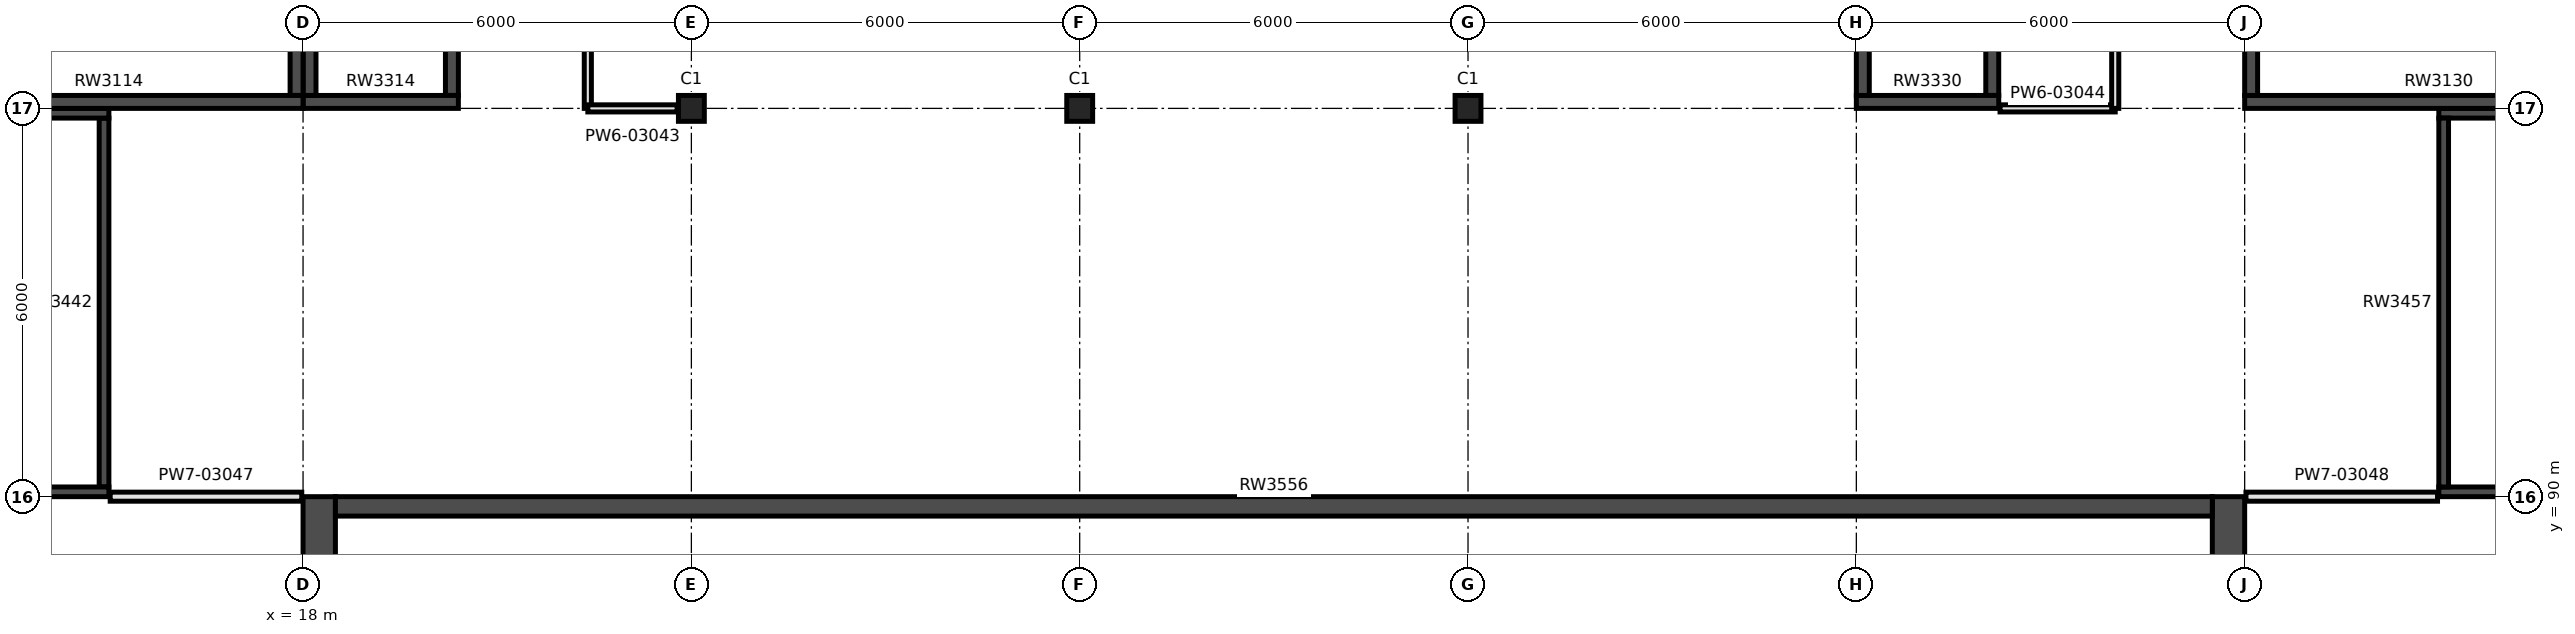
"""IFC4 building model, lengths in metres.
Left out: names, types, materials, properties, quantities, classifications, styles, units other than length and angle.
Written with IfcOpenShell. Run it as: python <this file> out.ifc"""

import sys

from ifc_helpers import new_model, si_unit, direction, frame, frame_2d, origin, origin_2d, place, context, subcontext, project, spatial, rectangle, extrude, element, fill, save


model = new_model("IFC4")
c1 = context("Model", 3, precision=1e-05, world=origin(), true_north=direction((0.0, 1.0)))
c2 = subcontext(c1, "Body", "Model", "MODEL_VIEW")
j1 = project(units=[si_unit("LENGTHUNIT", "METRE"), si_unit("PLANEANGLEUNIT", "RADIAN")], contexts=[c1])
p1 = place(None, origin())
s1 = spatial("IfcSite", under=j1, at=p1, CompositionType="ELEMENT")
p2 = place(p1, origin())
s2 = spatial("IfcBuilding", under=s1, at=p2, CompositionType="ELEMENT")
p3 = place(p2, frame((0.0, 0.0, 16.5)))
s3 = spatial("IfcBuildingStorey", under=s2, at=p3, CompositionType="ELEMENT", Elevation=16.5)
for number, where, z_axis, x_axis in (
    (1, (24.0, 96.0, 0.0), (0.0, 0.0, 1.0), (1.0, 0.0, 0.0)),
    (2, (30.0, 96.0, 0.0), (0.0, 0.0, 1.0), (1.0, 0.0, 0.0)),
    (3, (36.0, 96.0, 0.0), (0.0, 0.0, 1.0), (1.0, 0.0, 0.0)),
):
    element("IfcColumn", number, at=place(p3, frame(where, z_axis=z_axis, x_axis=x_axis)), inside=s3, PredefinedType="COLUMN", context=c2, shape_type="SweptSolid", body=[
        extrude(rectangle(XDim=0.4, YDim=0.4, at=origin_2d()), origin(), (0.0, 0.0, 1.0), 11.5),
    ])
p4 = place(p3, frame((12.0, 96.1, 0.0), z_axis=(0.0, 0.0, 1.0), x_axis=(1.0, 0.0, 0.0)))
e4 = element("IfcWall", 4, at=p4, inside=s3, PredefinedType="SHEAR", context=c2, shape_type="SweptSolid", body=[
    extrude(rectangle(XDim=6.0, YDim=0.2, at=frame_2d((3.0, 0.0))), origin(), (0.0, 0.0, 1.0), 11.5),
])
p5 = place(p3, frame((17.9, 96.2, 0.0), z_axis=(0.0, 0.0, 1.0), x_axis=(0.0, 1.0, 0.0)))
e5 = element("IfcWall", 5, at=p5, inside=s3, PredefinedType="SHEAR", context=c2, shape_type="SweptSolid", body=[
    extrude(rectangle(XDim=5.6, YDim=0.2, at=frame_2d((2.8, 0.0))), origin(), (0.0, 0.0, 1.0), 11.5),
])
p6 = place(p3, frame((48.0, 96.1, 0.0), z_axis=(0.0, 0.0, 1.0), x_axis=(1.0, 0.0, 0.0)))
e6 = element("IfcWall", 6, at=p6, inside=s3, PredefinedType="SHEAR", context=c2, shape_type="SweptSolid", body=[
    extrude(rectangle(XDim=6.0, YDim=0.2, at=frame_2d((3.0, 0.0))), origin(), (0.0, 0.0, 1.0), 11.5),
])
p7 = place(p3, frame((48.1, 96.2, 0.0), z_axis=(0.0, 0.0, 1.0), x_axis=(0.0, 1.0, 0.0)))
e7 = element("IfcWall", 7, at=p7, inside=s3, PredefinedType="SHEAR", context=c2, shape_type="SweptSolid", body=[
    extrude(rectangle(XDim=5.6, YDim=0.2, at=frame_2d((2.8, 0.0))), origin(), (0.0, 0.0, 1.0), 11.5),
])
p8 = place(p7, frame((4.4, 0.0, 0.0)))
e8 = element("IfcOpeningElement", 8, at=p8, cuts=e7, PredefinedType="OPENING", context=c2, shape_type="SweptSolid", body=[
    extrude(rectangle(XDim=1.1, YDim=2.2, at=frame_2d((0.55, 1.1))), frame((0.0, 0.11, 0.0), z_axis=(0.0, -1.0, 0.0), x_axis=(1.0, 0.0, 0.0)), (0.0, 0.0, 1.0), 0.22),
])
p9 = place(p3, frame((18.0, 96.1, 0.0), z_axis=(0.0, 0.0, 1.0), x_axis=(1.0, 0.0, 0.0)))
e9 = element("IfcWall", 9, at=p9, inside=s3, PredefinedType="SHEAR", context=c2, shape_type="SweptSolid", body=[
    extrude(rectangle(XDim=2.4, YDim=0.2, at=frame_2d((1.2, 0.0))), origin(), (0.0, 0.0, 1.0), 11.5),
])
for number, where, z_axis, x_axis in (
    (10, (18.1, 96.2, 0.0), (0.0, 0.0, 1.0), (0.0, 1.0, 0.0)),
    (11, (20.3, 96.2, 0.0), (0.0, 0.0, 1.0), (0.0, 1.0, 0.0)),
):
    element("IfcWall", number, at=place(p3, frame(where, z_axis=z_axis, x_axis=x_axis)), inside=s3, PredefinedType="SHEAR", context=c2, shape_type="SweptSolid", body=[
        extrude(rectangle(XDim=2.8, YDim=0.2, at=frame_2d((1.4, 0.0))), origin(), (0.0, 0.0, 1.0), 11.5),
    ])
p10 = place(p3, frame((42.0, 96.1, 0.0), z_axis=(0.0, 0.0, 1.0), x_axis=(1.0, 0.0, 0.0)))
e12 = element("IfcWall", 12, at=p10, inside=s3, PredefinedType="SHEAR", context=c2, shape_type="SweptSolid", body=[
    extrude(rectangle(XDim=2.2, YDim=0.2, at=frame_2d((1.1, 0.0))), origin(), (0.0, 0.0, 1.0), 11.5),
])
for number, where, z_axis, x_axis in (
    (13, (42.1, 96.2, 0.0), (0.0, 0.0, 1.0), (0.0, 1.0, 0.0)),
    (14, (44.1, 96.2, 0.0), (0.0, 0.0, 1.0), (0.0, 1.0, 0.0)),
):
    element("IfcWall", number, at=place(p3, frame(where, z_axis=z_axis, x_axis=x_axis)), inside=s3, PredefinedType="SHEAR", context=c2, shape_type="SweptSolid", body=[
        extrude(rectangle(XDim=2.0, YDim=0.2, at=frame_2d((1.0, 0.0))), origin(), (0.0, 0.0, 1.0), 11.5),
    ])
for number, where, z_axis, x_axis in (
    (15, (12.0, 95.925, 0.0), (0.0, 0.0, 1.0), (1.0, 0.0, 0.0)),
    (16, (12.0, 90.075, 0.0), (0.0, 0.0, 1.0), (1.0, 0.0, 0.0)),
):
    element("IfcWall", number, at=place(p3, frame(where, z_axis=z_axis, x_axis=x_axis)), inside=s3, PredefinedType="SHEAR", context=c2, shape_type="SweptSolid", body=[
        extrude(rectangle(XDim=3.0, YDim=0.15, at=frame_2d((1.5, 0.0))), origin(), (0.0, 0.0, 1.0), 11.5),
    ])
p11 = place(p3, frame((14.925, 90.15, 0.0), z_axis=(0.0, 0.0, 1.0), x_axis=(0.0, 1.0, 0.0)))
e17 = element("IfcWall", 17, at=p11, inside=s3, PredefinedType="SHEAR", context=c2, shape_type="SweptSolid", body=[
    extrude(rectangle(XDim=5.7, YDim=0.15, at=frame_2d((2.85, 0.0))), origin(), (0.0, 0.0, 1.0), 11.5),
])
for number, where, z_axis, x_axis in (
    (18, (51.0, 95.925, 0.0), (0.0, 0.0, 1.0), (1.0, 0.0, 0.0)),
    (19, (51.0, 90.075, 0.0), (0.0, 0.0, 1.0), (1.0, 0.0, 0.0)),
):
    element("IfcWall", number, at=place(p3, frame(where, z_axis=z_axis, x_axis=x_axis)), inside=s3, PredefinedType="SHEAR", context=c2, shape_type="SweptSolid", body=[
        extrude(rectangle(XDim=3.0, YDim=0.15, at=frame_2d((1.5, 0.0))), origin(), (0.0, 0.0, 1.0), 11.5),
    ])
p12 = place(p3, frame((51.075, 90.15, 0.0), z_axis=(0.0, 0.0, 1.0), x_axis=(0.0, 1.0, 0.0)))
e20 = element("IfcWall", 20, at=p12, inside=s3, PredefinedType="SHEAR", context=c2, shape_type="SweptSolid", body=[
    extrude(rectangle(XDim=5.7, YDim=0.15, at=frame_2d((2.85, 0.0))), origin(), (0.0, 0.0, 1.0), 11.5),
])
p13 = place(p3, frame((18.25, 54.5, 0.0), z_axis=(0.0, 0.0, 1.0), x_axis=(0.0, 1.0, 0.0)))
e21 = element("IfcWall", 21, at=p13, inside=s3, PredefinedType="SHEAR", context=c2, shape_type="SweptSolid", body=[
    extrude(rectangle(XDim=35.5, YDim=0.5, at=frame_2d((17.75, 0.0))), origin(), (0.0, 0.0, 1.0), 3.9),
])
p14 = place(p13, frame((29.35, 0.0, 0.0)))
e22 = element("IfcOpeningElement", 22, at=p14, cuts=e21, PredefinedType="OPENING", context=c2, shape_type="SweptSolid", body=[
    extrude(rectangle(XDim=1.3, YDim=2.1, at=frame_2d((0.65, 1.05))), frame((0.0, 0.26, 0.0), z_axis=(0.0, -1.0, 0.0), x_axis=(1.0, 0.0, 0.0)), (0.0, 0.0, 1.0), 0.52),
])
p15 = place(p13, frame((2.6, 0.0, 0.0)))
e23 = element("IfcOpeningElement", 23, at=p15, cuts=e21, PredefinedType="OPENING", context=c2, shape_type="SweptSolid", body=[
    extrude(rectangle(XDim=1.0, YDim=2.1, at=frame_2d((0.5, 1.05))), frame((0.0, 0.26, 0.0), z_axis=(0.0, -1.0, 0.0), x_axis=(1.0, 0.0, 0.0)), (0.0, 0.0, 1.0), 0.52),
])
p16 = place(p3, frame((47.75, 54.5, 0.0), z_axis=(0.0, 0.0, 1.0), x_axis=(0.0, 1.0, 0.0)))
e24 = element("IfcWall", 24, at=p16, inside=s3, PredefinedType="SHEAR", context=c2, shape_type="SweptSolid", body=[
    extrude(rectangle(XDim=35.5, YDim=0.5, at=frame_2d((17.75, 0.0))), origin(), (0.0, 0.0, 1.0), 3.9),
])
p17 = place(p16, frame((29.35, 0.0, 0.0)))
e25 = element("IfcOpeningElement", 25, at=p17, cuts=e24, PredefinedType="OPENING", context=c2, shape_type="SweptSolid", body=[
    extrude(rectangle(XDim=1.3, YDim=2.1, at=frame_2d((0.65, 1.05))), frame((0.0, 0.26, 0.0), z_axis=(0.0, -1.0, 0.0), x_axis=(1.0, 0.0, 0.0)), (0.0, 0.0, 1.0), 0.52),
])
p18 = place(p16, frame((2.6, 0.0, 0.0)))
e26 = element("IfcOpeningElement", 26, at=p18, cuts=e24, PredefinedType="OPENING", context=c2, shape_type="SweptSolid", body=[
    extrude(rectangle(XDim=1.0, YDim=2.1, at=frame_2d((0.5, 1.05))), frame((0.0, 0.26, 0.0), z_axis=(0.0, -1.0, 0.0), x_axis=(1.0, 0.0, 0.0)), (0.0, 0.0, 1.0), 0.52),
])
p19 = place(p3, frame((18.5, 89.85, 0.0), z_axis=(0.0, 0.0, 1.0), x_axis=(1.0, 0.0, 0.0)))
e27 = element("IfcWall", 27, at=p19, inside=s3, PredefinedType="SHEAR", context=c2, shape_type="SweptSolid", body=[
    extrude(rectangle(XDim=29.0, YDim=0.3, at=frame_2d((14.5, 0.0))), origin(), (0.0, 0.0, 1.0), 11.5),
])
p20 = place(p3, frame((22.4, 96.0, 0.0), z_axis=(0.0, 0.0, 1.0), x_axis=(0.0, 1.0, 0.0)))
e28 = element("IfcWall", 28, at=p20, inside=s3, PredefinedType="PARTITIONING", context=c2, shape_type="SweptSolid", body=[
    extrude(rectangle(XDim=3.2, YDim=0.11, at=frame_2d((1.6, 0.0))), origin(), (0.0, 0.0, 1.0), 6.28),
])
p21 = place(p20, frame((1.25, 0.0, 0.0)))
e29 = element("IfcOpeningElement", 29, at=p21, cuts=e28, PredefinedType="OPENING", context=c2, shape_type="SweptSolid", body=[
    extrude(rectangle(XDim=0.75, YDim=2.04, at=frame_2d((0.375, 1.02))), frame((0.0, 0.065, 0.0), z_axis=(0.0, -1.0, 0.0), x_axis=(1.0, 0.0, 0.0)), (0.0, 0.0, 1.0), 0.13),
])
p22 = place(p3, frame((22.4, 96.0, 0.0), z_axis=(0.0, 0.0, 1.0), x_axis=(1.0, 0.0, 0.0)))
e30 = element("IfcWall", 30, at=p22, inside=s3, PredefinedType="PARTITIONING", context=c2, shape_type="SweptSolid", body=[
    extrude(rectangle(XDim=1.38, YDim=0.11, at=frame_2d((0.69, 0.0))), origin(), (0.0, 0.0, 1.0), 6.28),
])
p23 = place(p3, frame((44.22, 96.0, 0.0), z_axis=(0.0, 0.0, 1.0), x_axis=(1.0, 0.0, 0.0)))
e31 = element("IfcWall", 31, at=p23, inside=s3, PredefinedType="PARTITIONING", context=c2, shape_type="SweptSolid", body=[
    extrude(rectangle(XDim=1.78, YDim=0.11, at=frame_2d((0.89, 0.0))), origin(), (0.0, 0.0, 1.0), 6.28),
])
p24 = place(p3, frame((46.0, 96.0, 0.0), z_axis=(0.0, 0.0, 1.0), x_axis=(0.0, 1.0, 0.0)))
e32 = element("IfcWall", 32, at=p24, inside=s3, PredefinedType="PARTITIONING", context=c2, shape_type="SweptSolid", body=[
    extrude(rectangle(XDim=2.4, YDim=0.11, at=frame_2d((1.2, 0.0))), origin(), (0.0, 0.0, 1.0), 6.28),
])
p25 = place(p24, frame((0.85, 0.0, 0.0)))
e33 = element("IfcOpeningElement", 33, at=p25, cuts=e32, PredefinedType="OPENING", context=c2, shape_type="SweptSolid", body=[
    extrude(rectangle(XDim=0.75, YDim=2.04, at=frame_2d((0.375, 1.02))), frame((0.0, 0.065, 0.0), z_axis=(0.0, -1.0, 0.0), x_axis=(1.0, 0.0, 0.0)), (0.0, 0.0, 1.0), 0.13),
])
p26 = place(p3, frame((15.02, 90.0, 0.0), z_axis=(0.0, 0.0, 1.0), x_axis=(1.0, 0.0, 0.0)))
e34 = element("IfcWall", 34, at=p26, inside=s3, PredefinedType="PARTITIONING", context=c2, shape_type="SweptSolid", body=[
    extrude(rectangle(XDim=2.96, YDim=0.14, at=frame_2d((1.48, 0.0))), origin(), (0.0, 0.0, 1.0), 3.9),
])
p27 = place(p26, frame((0.53, 0.0, 0.0)))
e35 = element("IfcOpeningElement", 35, at=p27, cuts=e34, PredefinedType="OPENING", context=c2, shape_type="SweptSolid", body=[
    extrude(rectangle(XDim=1.8, YDim=2.1, at=frame_2d((0.9, 1.05))), frame((0.0, 0.08, 0.0), z_axis=(0.0, -1.0, 0.0), x_axis=(1.0, 0.0, 0.0)), (0.0, 0.0, 1.0), 0.16),
])
p28 = place(p3, frame((48.02, 90.0, 0.0), z_axis=(0.0, 0.0, 1.0), x_axis=(1.0, 0.0, 0.0)))
e36 = element("IfcWall", 36, at=p28, inside=s3, PredefinedType="PARTITIONING", context=c2, shape_type="SweptSolid", body=[
    extrude(rectangle(XDim=2.96, YDim=0.14, at=frame_2d((1.48, 0.0))), origin(), (0.0, 0.0, 1.0), 3.9),
])
p29 = place(p28, frame((0.53, 0.0, 0.0)))
e37 = element("IfcOpeningElement", 37, at=p29, cuts=e36, PredefinedType="OPENING", context=c2, shape_type="SweptSolid", body=[
    extrude(rectangle(XDim=1.8, YDim=2.1, at=frame_2d((0.9, 1.05))), frame((0.0, 0.08, 0.0), z_axis=(0.0, -1.0, 0.0), x_axis=(1.0, 0.0, 0.0)), (0.0, 0.0, 1.0), 0.16),
])
p30 = place(p25, origin())
e38 = element("IfcDoor", 38, at=p30, inside=s3, OperationType="SINGLE_SWING_LEFT", PredefinedType="DOOR", context=c2, shape_type="SweptSolid", body=[
    extrude(rectangle(XDim=0.75, YDim=2.04, at=frame_2d((0.375, 1.02))), frame((0.0, 0.025, 0.0), z_axis=(0.0, -1.0, 0.0), x_axis=(1.0, 0.0, 0.0)), (0.0, 0.0, 1.0), 0.05),
])
fill(e33, e38)
p31 = place(p27, frame((1.8, 0.0, 0.0), z_axis=(0.0, 0.0, 1.0), x_axis=(-1.0, 0.0, 0.0)))
e39 = element("IfcDoor", 39, at=p31, inside=s3, OperationType="DOUBLE_DOOR_SINGLE_SWING", PredefinedType="DOOR", context=c2, shape_type="SweptSolid", body=[
    extrude(rectangle(XDim=1.8, YDim=2.1, at=frame_2d((0.9, 1.05))), frame((0.0, 0.025, 0.0), z_axis=(0.0, -1.0, 0.0), x_axis=(1.0, 0.0, 0.0)), (0.0, 0.0, 1.0), 0.05),
])
fill(e35, e39)
p32 = place(p29, frame((1.8, 0.0, 0.0), z_axis=(0.0, 0.0, 1.0), x_axis=(-1.0, 0.0, 0.0)))
e40 = element("IfcDoor", 40, at=p32, inside=s3, OperationType="DOUBLE_DOOR_SINGLE_SWING", PredefinedType="DOOR", context=c2, shape_type="SweptSolid", body=[
    extrude(rectangle(XDim=1.8, YDim=2.1, at=frame_2d((0.9, 1.05))), frame((0.0, 0.025, 0.0), z_axis=(0.0, -1.0, 0.0), x_axis=(1.0, 0.0, 0.0)), (0.0, 0.0, 1.0), 0.05),
])
fill(e37, e40)
save(model, sys.argv[1])
